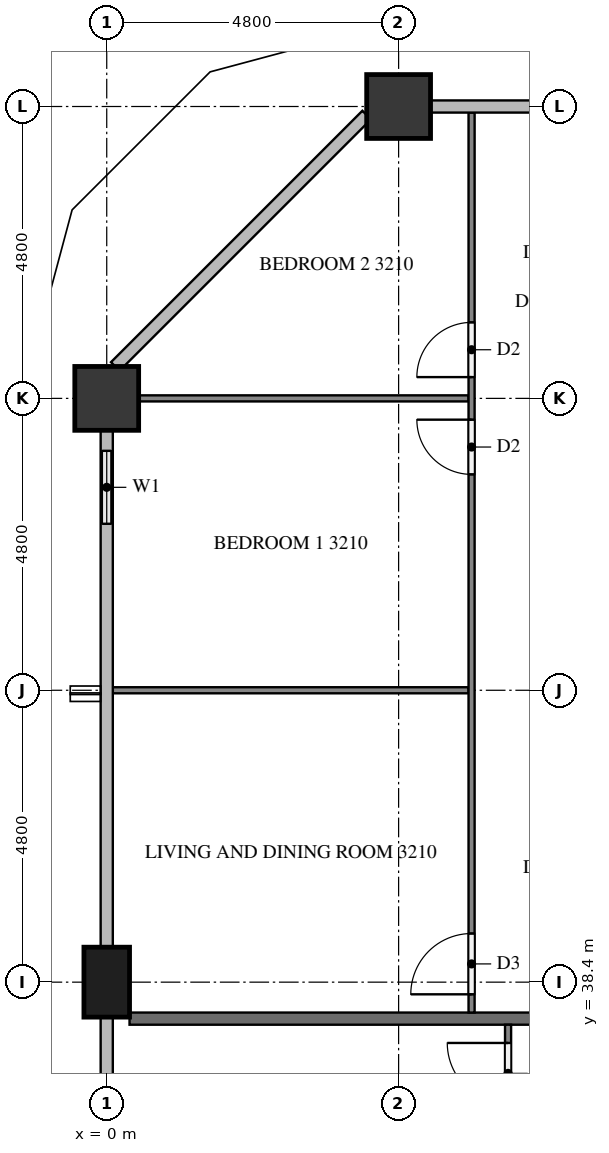
"""IFC4 building model, lengths in metres.
Left out: names, types, materials, properties, quantities, classifications, styles, units other than length and angle.
Written with IfcOpenShell. Run it as: python <this file> out.ifc"""

import sys

from ifc_helpers import new_model, si_unit, direction, frame, frame_2d, origin, origin_2d, place, context, subcontext, project, spatial, rectangle, extrude, element, fill, save


model = new_model("IFC4")
c1 = context("Model", 3, precision=1e-05, world=origin(), true_north=direction((0.0, 1.0)))
c2 = subcontext(c1, "Body", "Model", "MODEL_VIEW")
j1 = project(units=[si_unit("LENGTHUNIT", "METRE"), si_unit("PLANEANGLEUNIT", "RADIAN")], contexts=[c1])
p1 = place(None, origin())
s1 = spatial("IfcSite", under=j1, at=p1, CompositionType="ELEMENT")
p2 = place(p1, origin())
s2 = spatial("IfcBuilding", under=s1, at=p2, CompositionType="ELEMENT")
p3 = place(p2, frame((0.0, 0.0, 126.1)))
s3 = spatial("IfcBuildingStorey", under=s2, at=p3, CompositionType="ELEMENT", Elevation=126.1)
for number, where, z_axis, x_axis in (
    (1, (4.8, 52.8, 0.0), (0.0, 0.0, 1.0), (1.0, 0.0, 0.0)),
    (2, (0.0, 48.0, 0.0), (0.0, 0.0, 1.0), (1.0, 0.0, 0.0)),
):
    element("IfcColumn", number, at=place(p3, frame(where, z_axis=z_axis, x_axis=x_axis)), inside=s3, PredefinedType="COLUMN", context=c2, shape_type="SweptSolid", body=[
        extrude(rectangle(XDim=1.05, YDim=1.05, at=origin_2d()), origin(), (0.0, 0.0, 1.0), 3.2),
    ])
p4 = place(p3, frame((0.0, 38.4, 0.0), z_axis=(0.0, 0.0, 1.0), x_axis=(0.0, 1.0, 0.0)))
e3 = element("IfcColumn", 3, at=p4, inside=s3, PredefinedType="COLUMN", context=c2, shape_type="SweptSolid", body=[
    extrude(rectangle(XDim=1.15, YDim=0.75, at=origin_2d()), origin(), (0.0, 0.0, 1.0), 3.2),
])
p5 = place(p3, frame((0.0, 47.475, 0.0), z_axis=(0.0, 0.0, 1.0), x_axis=(0.0, -1.0, 0.0)))
e4 = element("IfcWall", 4, at=p5, inside=s3, PredefinedType="SOLIDWALL", context=c2, shape_type="SweptSolid", body=[
    extrude(rectangle(XDim=1.875, YDim=0.15, at=frame_2d((0.938, 0.0))), origin(), (0.0, 0.0, 1.0), 3.2),
])
p6 = place(p5, frame((0.337, 0.0, 0.9)))
e5 = element("IfcOpeningElement", 5, at=p6, cuts=e4, PredefinedType="OPENING", context=c2, shape_type="SweptSolid", body=[
    extrude(rectangle(XDim=1.2, YDim=1.4, at=frame_2d((0.6, 0.7))), frame((0.0, 0.085, 0.0), z_axis=(0.0, -1.0, 0.0), x_axis=(1.0, 0.0, 0.0)), (0.0, 0.0, 1.0), 0.17),
])
p7 = place(p3, frame((0.375, 37.8, 0.0), z_axis=(0.0, 0.0, 1.0), x_axis=(1.0, 0.0, 0.0)))
e6 = element("IfcWall", 6, at=p7, inside=s3, PredefinedType="PARTITIONING", context=c2, shape_type="SweptSolid", body=[
    extrude(rectangle(XDim=9.525, YDim=0.2, at=frame_2d((4.762, 0.0))), origin(), (0.0, 0.0, 1.0), 3.2),
])
p8 = place(p3, frame((5.95, 43.2, 0.0), z_axis=(0.0, 0.0, 1.0), x_axis=(-1.0, 0.0, 0.0)))
e7 = element("IfcWall", 7, at=p8, inside=s3, PredefinedType="PARTITIONING", context=c2, shape_type="SweptSolid", body=[
    extrude(rectangle(XDim=5.85, YDim=0.1, at=frame_2d((2.925, 0.0))), origin(), (0.0, 0.0, 1.0), 3.2),
])
p9 = place(p3, frame((5.95, 48.0, 0.0), z_axis=(0.0, 0.0, 1.0), x_axis=(-1.0, 0.0, 0.0)))
e8 = element("IfcWall", 8, at=p9, inside=s3, PredefinedType="PARTITIONING", context=c2, shape_type="SweptSolid", body=[
    extrude(rectangle(XDim=5.425, YDim=0.1, at=frame_2d((2.712, 0.0))), origin(), (0.0, 0.0, 1.0), 3.2),
])
p10 = place(p3, frame((6.0, 37.9, 0.0), z_axis=(0.0, 0.0, 1.0), x_axis=(0.0, 1.0, 0.0)))
e9 = element("IfcWall", 9, at=p10, inside=s3, PredefinedType="PARTITIONING", context=c2, shape_type="SweptSolid", body=[
    extrude(rectangle(XDim=14.8, YDim=0.1, at=frame_2d((7.4, 0.0))), origin(), (0.0, 0.0, 1.0), 3.2),
])
p11 = place(p10, frame((0.3, 0.0, 0.0)))
e10 = element("IfcOpeningElement", 10, at=p11, cuts=e9, PredefinedType="OPENING", context=c2, shape_type="SweptSolid", body=[
    extrude(rectangle(XDim=1.0, YDim=2.1, at=frame_2d((0.5, 1.05))), frame((0.0, 0.06, 0.0), z_axis=(0.0, -1.0, 0.0), x_axis=(1.0, 0.0, 0.0)), (0.0, 0.0, 1.0), 0.12),
])
p12 = place(p10, frame((8.85, 0.0, 0.0)))
e11 = element("IfcOpeningElement", 11, at=p12, cuts=e9, PredefinedType="OPENING", context=c2, shape_type="SweptSolid", body=[
    extrude(rectangle(XDim=0.9, YDim=2.1, at=frame_2d((0.45, 1.05))), frame((0.0, 0.06, 0.0), z_axis=(0.0, -1.0, 0.0), x_axis=(1.0, 0.0, 0.0)), (0.0, 0.0, 1.0), 0.12),
])
p13 = place(p10, frame((10.45, 0.0, 0.0)))
e12 = element("IfcOpeningElement", 12, at=p13, cuts=e9, PredefinedType="OPENING", context=c2, shape_type="SweptSolid", body=[
    extrude(rectangle(XDim=0.9, YDim=2.1, at=frame_2d((0.45, 1.05))), frame((0.0, 0.06, 0.0), z_axis=(0.0, -1.0, 0.0), x_axis=(1.0, 0.0, 0.0)), (0.0, 0.0, 1.0), 0.12),
])
p14 = place(p3, frame((6.6, 28.9, 0.0), z_axis=(0.0, 0.0, 1.0), x_axis=(0.0, 1.0, 0.0)))
e13 = element("IfcWall", 13, at=p14, inside=s3, PredefinedType="PARTITIONING", context=c2, shape_type="SweptSolid", body=[
    extrude(rectangle(XDim=8.8, YDim=0.1, at=frame_2d((4.4, 0.0))), origin(), (0.0, 0.0, 1.0), 3.2),
])
p15 = place(p14, frame((7.5, 0.0, 0.0)))
e14 = element("IfcOpeningElement", 14, at=p15, cuts=e13, PredefinedType="OPENING", context=c2, shape_type="SweptSolid", body=[
    extrude(rectangle(XDim=1.0, YDim=2.1, at=frame_2d((0.5, 1.05))), frame((0.0, 0.06, 0.0), z_axis=(0.0, -1.0, 0.0), x_axis=(1.0, 0.0, 0.0)), (0.0, 0.0, 1.0), 0.12),
])
p16 = place(p14, frame((0.3, 0.0, 0.0)))
e15 = element("IfcOpeningElement", 15, at=p16, cuts=e13, PredefinedType="OPENING", context=c2, shape_type="SweptSolid", body=[
    extrude(rectangle(XDim=0.9, YDim=2.1, at=frame_2d((0.45, 1.05))), frame((0.0, 0.06, 0.0), z_axis=(0.0, -1.0, 0.0), x_axis=(1.0, 0.0, 0.0)), (0.0, 0.0, 1.0), 0.12),
])
p17 = place(p6, origin())
e16 = element("IfcWindow", 16, at=p17, inside=s3, PartitioningType="SINGLE_PANEL", PredefinedType="WINDOW", context=c2, shape_type="SweptSolid", body=[
    extrude(rectangle(XDim=1.2, YDim=1.4, at=frame_2d((0.6, 0.7))), frame((0.0, 0.03, 0.0), z_axis=(0.0, -1.0, 0.0), x_axis=(1.0, 0.0, 0.0)), (0.0, 0.0, 1.0), 0.06),
])
fill(e5, e16)
p18 = place(p11, origin())
e17 = element("IfcDoor", 17, at=p18, inside=s3, OperationType="SINGLE_SWING_LEFT", PredefinedType="DOOR", context=c2, shape_type="SweptSolid", body=[
    extrude(rectangle(XDim=1.0, YDim=2.1, at=frame_2d((0.5, 1.05))), frame((0.0, 0.025, 0.0), z_axis=(0.0, -1.0, 0.0), x_axis=(1.0, 0.0, 0.0)), (0.0, 0.0, 1.0), 0.05),
])
fill(e10, e17)
p19 = place(p12, origin())
e18 = element("IfcDoor", 18, at=p19, inside=s3, OperationType="SINGLE_SWING_RIGHT", PredefinedType="DOOR", context=c2, shape_type="SweptSolid", body=[
    extrude(rectangle(XDim=0.9, YDim=2.1, at=frame_2d((0.45, 1.05))), frame((0.0, 0.025, 0.0), z_axis=(0.0, -1.0, 0.0), x_axis=(1.0, 0.0, 0.0)), (0.0, 0.0, 1.0), 0.05),
])
fill(e11, e18)
p20 = place(p13, origin())
e19 = element("IfcDoor", 19, at=p20, inside=s3, OperationType="SINGLE_SWING_LEFT", PredefinedType="DOOR", context=c2, shape_type="SweptSolid", body=[
    extrude(rectangle(XDim=0.9, YDim=2.1, at=frame_2d((0.45, 1.05))), frame((0.0, 0.025, 0.0), z_axis=(0.0, -1.0, 0.0), x_axis=(1.0, 0.0, 0.0)), (0.0, 0.0, 1.0), 0.05),
])
fill(e12, e19)
p21 = place(p15, origin())
e20 = element("IfcDoor", 20, at=p21, inside=s3, OperationType="SINGLE_SWING_RIGHT", PredefinedType="DOOR", context=c2, shape_type="SweptSolid", body=[
    extrude(rectangle(XDim=1.0, YDim=2.1, at=frame_2d((0.5, 1.05))), frame((0.0, 0.025, 0.0), z_axis=(0.0, -1.0, 0.0), x_axis=(1.0, 0.0, 0.0)), (0.0, 0.0, 1.0), 0.05),
])
fill(e14, e20)
save(model, sys.argv[1])
